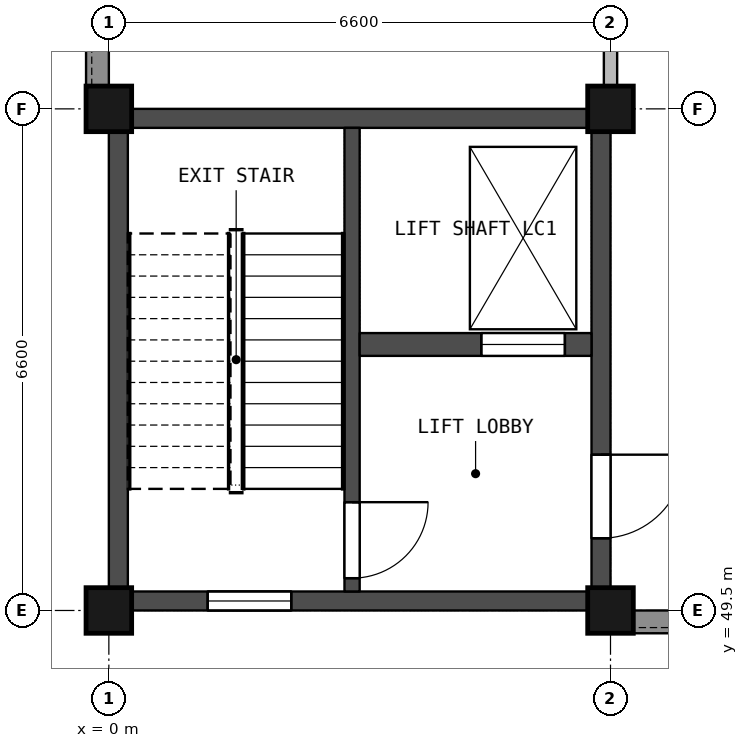
"""IFC4 building model, lengths in metres.
Left out: names, types, materials, properties, quantities, classifications, styles, units other than length and angle.
Written with IfcOpenShell. Run it as: python <this file> out.ifc"""

import sys

from ifc_helpers import new_model, si_unit, direction, frame, frame_2d, origin, origin_2d, place, context, subcontext, project, spatial, rectangle, extrude, element, fill, save


model = new_model("IFC4")
c1 = context("Model", 3, precision=1e-05, world=origin(), true_north=direction((0.0, 1.0)))
c2 = subcontext(c1, "Body", "Model", "MODEL_VIEW")
j1 = project(units=[si_unit("LENGTHUNIT", "METRE"), si_unit("PLANEANGLEUNIT", "RADIAN")], contexts=[c1])
p1 = place(None, origin())
s1 = spatial("IfcSite", under=j1, at=p1, CompositionType="ELEMENT")
p2 = place(p1, origin())
s2 = spatial("IfcBuilding", under=s1, at=p2, CompositionType="ELEMENT")
p3 = place(p2, frame((0.0, 0.0, 5.4)))
s3 = spatial("IfcBuildingStorey", under=s2, at=p3, CompositionType="ELEMENT", Elevation=5.4)
for number, where, z_axis, x_axis in (
    (1, (0.0, 49.5, 0.0), (0.0, 0.0, 1.0), (1.0, 0.0, 0.0)),
    (2, (0.0, 56.1, 0.0), (0.0, 0.0, 1.0), (1.0, 0.0, 0.0)),
    (3, (6.6, 49.5, 0.0), (0.0, 0.0, 1.0), (1.0, 0.0, 0.0)),
    (4, (6.6, 56.1, 0.0), (0.0, 0.0, 1.0), (1.0, 0.0, 0.0)),
):
    element("IfcColumn", number, at=place(p3, frame(where, z_axis=z_axis, x_axis=x_axis)), inside=s3, PredefinedType="COLUMN", context=c2, shape_type="SweptSolid", body=[
        extrude(rectangle(XDim=0.6, YDim=0.6, at=origin_2d()), origin(), (0.0, 0.0, 1.0), 4.5),
    ])
p4 = place(p3, frame((6.475, 49.5, 0.0), z_axis=(0.0, 0.0, 1.0), x_axis=(0.0, 1.0, 0.0)))
e5 = element("IfcWall", 5, at=p4, inside=s3, PredefinedType="SHEAR", context=c2, shape_type="SweptSolid", body=[
    extrude(rectangle(XDim=6.6, YDim=0.25, at=frame_2d((3.3, 0.0))), origin(), (0.0, 0.0, 1.0), 4.15),
])
p5 = place(p4, frame((0.95, 0.0, 0.0)))
e6 = element("IfcOpeningElement", 6, at=p5, cuts=e5, PredefinedType="OPENING", context=c2, shape_type="SweptSolid", body=[
    extrude(rectangle(XDim=1.1, YDim=2.1, at=frame_2d((0.55, 1.05))), frame((0.0, 0.135, 0.0), z_axis=(0.0, -1.0, 0.0), x_axis=(1.0, 0.0, 0.0)), (0.0, 0.0, 1.0), 0.27),
])
p6 = place(p3, frame((0.125, 49.5, 0.0), z_axis=(0.0, 0.0, 1.0), x_axis=(0.0, 1.0, 0.0)))
e7 = element("IfcWall", 7, at=p6, inside=s3, PredefinedType="SHEAR", context=c2, shape_type="SweptSolid", body=[
    extrude(rectangle(XDim=6.6, YDim=0.25, at=frame_2d((3.3, 0.0))), origin(), (0.0, 0.0, 1.0), 4.15),
])
p7 = place(p3, frame((6.35, 49.625, 0.0), z_axis=(0.0, 0.0, 1.0), x_axis=(-1.0, 0.0, 0.0)))
e8 = element("IfcWall", 8, at=p7, inside=s3, PredefinedType="SHEAR", context=c2, shape_type="SweptSolid", body=[
    extrude(rectangle(XDim=6.1, YDim=0.25, at=frame_2d((3.05, 0.0))), origin(), (0.0, 0.0, 1.0), 4.15),
])
p8 = place(p7, frame((3.95, 0.0, 0.7)))
e9 = element("IfcOpeningElement", 9, at=p8, cuts=e8, PredefinedType="OPENING", context=c2, shape_type="SweptSolid", body=[
    extrude(rectangle(XDim=1.1, YDim=1.5, at=frame_2d((0.55, 0.75))), frame((0.0, 0.135, 0.0), z_axis=(0.0, -1.0, 0.0), x_axis=(1.0, 0.0, 0.0)), (0.0, 0.0, 1.0), 0.27),
])
p9 = place(p3, frame((6.35, 55.975, 0.0), z_axis=(0.0, 0.0, 1.0), x_axis=(-1.0, 0.0, 0.0)))
e10 = element("IfcWall", 10, at=p9, inside=s3, PredefinedType="SHEAR", context=c2, shape_type="SweptSolid", body=[
    extrude(rectangle(XDim=6.1, YDim=0.25, at=frame_2d((3.05, 0.0))), origin(), (0.0, 0.0, 1.0), 4.15),
])
p10 = place(p3, frame((3.2, 49.75, 0.0), z_axis=(0.0, 0.0, 1.0), x_axis=(0.0, 1.0, 0.0)))
e11 = element("IfcWall", 11, at=p10, inside=s3, PredefinedType="SHEAR", context=c2, shape_type="SweptSolid", body=[
    extrude(rectangle(XDim=6.1, YDim=0.2, at=frame_2d((3.05, 0.0))), origin(), (0.0, 0.0, 1.0), 4.15),
])
p11 = place(p10, frame((0.175, 0.0, 0.0)))
e12 = element("IfcOpeningElement", 12, at=p11, cuts=e11, PredefinedType="OPENING", context=c2, shape_type="SweptSolid", body=[
    extrude(rectangle(XDim=1.0, YDim=2.1, at=frame_2d((0.5, 1.05))), frame((0.0, 0.11, 0.0), z_axis=(0.0, -1.0, 0.0), x_axis=(1.0, 0.0, 0.0)), (0.0, 0.0, 1.0), 0.22),
])
p12 = place(p3, frame((6.35, 53.0, 0.0), z_axis=(0.0, 0.0, 1.0), x_axis=(-1.0, 0.0, 0.0)))
e13 = element("IfcWall", 13, at=p12, inside=s3, PredefinedType="SHEAR", context=c2, shape_type="SweptSolid", body=[
    extrude(rectangle(XDim=3.05, YDim=0.3, at=frame_2d((1.525, 0.0))), origin(), (0.0, 0.0, 1.0), 4.15),
])
p13 = place(p12, frame((0.35, 0.0, 0.0)))
e14 = element("IfcOpeningElement", 14, at=p13, cuts=e13, PredefinedType="OPENING", context=c2, shape_type="SweptSolid", body=[
    extrude(rectangle(XDim=1.1, YDim=2.2, at=frame_2d((0.55, 1.1))), frame((0.0, 0.16, 0.0), z_axis=(0.0, -1.0, 0.0), x_axis=(1.0, 0.0, 0.0)), (0.0, 0.0, 1.0), 0.32),
])
p14 = place(p3, frame((12.9, 49.35, 0.0), z_axis=(0.0, 0.0, 1.0), x_axis=(-1.0, 0.0, 0.0)))
e15 = element("IfcWall", 15, at=p14, inside=s3, PredefinedType="STANDARD", context=c2, shape_type="SweptSolid", body=[
    extrude(rectangle(XDim=6.0, YDim=0.3, at=frame_2d((3.0, 0.0))), origin(), (0.0, 0.0, 1.0), 3.25),
])
p15 = place(p14, frame((4.05, 0.0, 1.1)))
e16 = element("IfcOpeningElement", 16, at=p15, cuts=e15, PredefinedType="OPENING", context=c2, shape_type="SweptSolid", body=[
    extrude(rectangle(XDim=1.2, YDim=1.2, at=frame_2d((0.6, 0.6))), frame((0.0, 0.16, 0.0), z_axis=(0.0, -1.0, 0.0), x_axis=(1.0, 0.0, 0.0)), (0.0, 0.0, 1.0), 0.32),
])
p16 = place(p3, frame((-0.15, 56.4, 0.0), z_axis=(0.0, 0.0, 1.0), x_axis=(0.0, 1.0, 0.0)))
e17 = element("IfcWall", 17, at=p16, inside=s3, PredefinedType="STANDARD", context=c2, shape_type="SweptSolid", body=[
    extrude(rectangle(XDim=6.0, YDim=0.3, at=frame_2d((3.0, 0.0))), origin(), (0.0, 0.0, 1.0), 3.25),
])
p17 = place(p16, frame((0.6, 0.0, 1.2)))
e18 = element("IfcOpeningElement", 18, at=p17, cuts=e17, PredefinedType="OPENING", context=c2, shape_type="SweptSolid", body=[
    extrude(rectangle(XDim=1.5, YDim=1.2, at=frame_2d((0.75, 0.6))), frame((0.0, 0.16, 0.0), z_axis=(0.0, -1.0, 0.0), x_axis=(1.0, 0.0, 0.0)), (0.0, 0.0, 1.0), 0.32),
])
p18 = place(p16, frame((3.9, 0.0, 1.2)))
e19 = element("IfcOpeningElement", 19, at=p18, cuts=e17, PredefinedType="OPENING", context=c2, shape_type="SweptSolid", body=[
    extrude(rectangle(XDim=1.5, YDim=1.2, at=frame_2d((0.75, 0.6))), frame((0.0, 0.16, 0.0), z_axis=(0.0, -1.0, 0.0), x_axis=(1.0, 0.0, 0.0)), (0.0, 0.0, 1.0), 0.32),
])
p19 = place(p3, frame((6.6, 56.4, 0.0), z_axis=(0.0, 0.0, 1.0), x_axis=(0.0, 1.0, 0.0)))
e20 = element("IfcWall", 20, at=p19, inside=s3, PredefinedType="PARTITIONING", context=c2, shape_type="SweptSolid", body=[
    extrude(rectangle(XDim=6.0, YDim=0.175, at=frame_2d((3.0, 0.0))), origin(), (0.0, 0.0, 1.0), 3.25),
])
p20 = place(p19, frame((4.15, 0.0, 0.0)))
e21 = element("IfcOpeningElement", 21, at=p20, cuts=e20, PredefinedType="OPENING", context=c2, shape_type="SweptSolid", body=[
    extrude(rectangle(XDim=1.0, YDim=2.1, at=frame_2d((0.5, 1.05))), frame((0.0, 0.097, 0.0), z_axis=(0.0, -1.0, 0.0), x_axis=(1.0, 0.0, 0.0)), (0.0, 0.0, 1.0), 0.195),
])
p21 = place(p5, origin())
e22 = element("IfcDoor", 22, at=p21, inside=s3, OperationType="SINGLE_SWING_RIGHT", PredefinedType="DOOR", context=c2, shape_type="SweptSolid", body=[
    extrude(rectangle(XDim=1.1, YDim=2.1, at=frame_2d((0.55, 1.05))), frame((0.0, 0.025, 0.0), z_axis=(0.0, -1.0, 0.0), x_axis=(1.0, 0.0, 0.0)), (0.0, 0.0, 1.0), 0.05),
])
fill(e6, e22)
p22 = place(p11, origin())
e23 = element("IfcDoor", 23, at=p22, inside=s3, OperationType="SINGLE_SWING_RIGHT", PredefinedType="DOOR", context=c2, shape_type="SweptSolid", body=[
    extrude(rectangle(XDim=1.0, YDim=2.1, at=frame_2d((0.5, 1.05))), frame((0.0, 0.025, 0.0), z_axis=(0.0, -1.0, 0.0), x_axis=(1.0, 0.0, 0.0)), (0.0, 0.0, 1.0), 0.05),
])
fill(e12, e23)
p23 = place(p13, origin())
e24 = element("IfcDoor", 24, at=p23, inside=s3, OperationType="DOUBLE_DOOR_SLIDING", PredefinedType="NOTDEFINED", context=c2, shape_type="SweptSolid", body=[
    extrude(rectangle(XDim=1.1, YDim=2.2, at=frame_2d((0.55, 1.1))), frame((0.0, 0.025, 0.0), z_axis=(0.0, -1.0, 0.0), x_axis=(1.0, 0.0, 0.0)), (0.0, 0.0, 1.0), 0.05),
])
fill(e14, e24)
p24 = place(p8, origin())
e25 = element("IfcWindow", 25, at=p24, inside=s3, PartitioningType="SINGLE_PANEL", PredefinedType="WINDOW", context=c2, shape_type="SweptSolid", body=[
    extrude(rectangle(XDim=1.1, YDim=1.5, at=frame_2d((0.55, 0.75))), frame((0.0, 0.03, 0.0), z_axis=(0.0, -1.0, 0.0), x_axis=(1.0, 0.0, 0.0)), (0.0, 0.0, 1.0), 0.06),
])
fill(e9, e25)
save(model, sys.argv[1])
